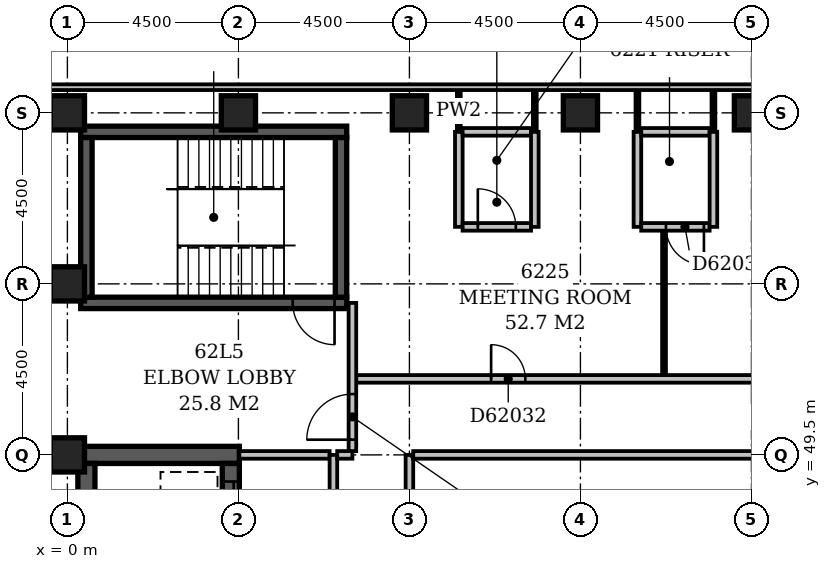
"""IFC4 building model, lengths in metres.
Left out: names, types, materials, properties, quantities, classifications, styles, units other than length and angle.
Written with IfcOpenShell. Run it as: python <this file> out.ifc"""

import sys

from ifc_helpers import new_model, si_unit, direction, frame, frame_2d, origin, origin_2d, place, context, subcontext, project, spatial, rectangle, extrude, element, fill, save


model = new_model("IFC4")
c1 = context("Model", 3, precision=1e-05, world=origin(), true_north=direction((0.0, 1.0)))
c2 = subcontext(c1, "Body", "Model", "MODEL_VIEW")
j1 = project(units=[si_unit("LENGTHUNIT", "METRE"), si_unit("PLANEANGLEUNIT", "RADIAN")], contexts=[c1])
p1 = place(None, origin())
s1 = spatial("IfcSite", under=j1, at=p1, CompositionType="ELEMENT")
p2 = place(p1, origin())
s2 = spatial("IfcBuilding", under=s1, at=p2, CompositionType="ELEMENT")
p3 = place(p2, frame((0.0, 0.0, 240.2)))
s3 = spatial("IfcBuildingStorey", under=s2, at=p3, CompositionType="ELEMENT", Elevation=240.2)
p4 = place(p3, frame((0.275, 49.5, -0.3), z_axis=(0.0, 0.0, 1.0), x_axis=(1.0, 0.0, 0.0)))
e1 = element("IfcWall", 1, at=p4, inside=s3, PredefinedType="SHEAR", context=c2, shape_type="SweptSolid", body=[
    extrude(rectangle(XDim=4.25, YDim=0.45, at=frame_2d((2.125, 0.0))), origin(), (0.0, 0.0, 1.0), 3.6),
])
p5 = place(p3, frame((0.35, 53.5, -0.3), z_axis=(0.0, 0.0, 1.0), x_axis=(1.0, 0.0, 0.0)))
e2 = element("IfcWall", 2, at=p5, inside=s3, PredefinedType="SHEAR", context=c2, shape_type="SweptSolid", body=[
    extrude(rectangle(XDim=7.0, YDim=0.3, at=frame_2d((3.5, 0.0))), origin(), (0.0, 0.0, 1.0), 3.6),
])
p6 = place(p5, frame((5.58, 0.0, 0.3)))
e3 = element("IfcOpeningElement", 3, at=p6, cuts=e2, PredefinedType="OPENING", context=c2, shape_type="SweptSolid", body=[
    extrude(rectangle(XDim=1.1, YDim=2.1, at=frame_2d((0.55, 1.05))), frame((0.0, 0.162, 0.0), z_axis=(0.0, -1.0, 0.0), x_axis=(1.0, 0.0, 0.0)), (0.0, 0.0, 1.0), 0.324),
])
p7 = place(p3, frame((0.35, 58.0, -0.3), z_axis=(0.0, 0.0, 1.0), x_axis=(1.0, 0.0, 0.0)))
e4 = element("IfcWall", 4, at=p7, inside=s3, PredefinedType="SHEAR", context=c2, shape_type="SweptSolid", body=[
    extrude(rectangle(XDim=7.0, YDim=0.3, at=frame_2d((3.5, 0.0))), origin(), (0.0, 0.0, 1.0), 3.6),
])
p8 = place(p3, frame((0.5, 27.15, -0.3), z_axis=(0.0, 0.0, 1.0), x_axis=(0.0, 1.0, 0.0)))
e5 = element("IfcWall", 5, at=p8, inside=s3, PredefinedType="SHEAR", context=c2, shape_type="SweptSolid", body=[
    extrude(rectangle(XDim=22.125, YDim=0.45, at=frame_2d((11.062, 0.0))), origin(), (0.0, 0.0, 1.0), 3.6),
])
p9 = place(p3, frame((0.5, 53.65, -0.3), z_axis=(0.0, 0.0, 1.0), x_axis=(0.0, 1.0, 0.0)))
e6 = element("IfcWall", 6, at=p9, inside=s3, PredefinedType="SHEAR", context=c2, shape_type="SweptSolid", body=[
    extrude(rectangle(XDim=4.2, YDim=0.3, at=frame_2d((2.1, 0.0))), origin(), (0.0, 0.0, 1.0), 3.6),
])
p10 = place(p3, frame((4.3, 27.15, -0.3), z_axis=(0.0, 0.0, 1.0), x_axis=(0.0, 1.0, 0.0)))
e7 = element("IfcWall", 7, at=p10, inside=s3, PredefinedType="SHEAR", context=c2, shape_type="SweptSolid", body=[
    extrude(rectangle(XDim=22.125, YDim=0.45, at=frame_2d((11.062, 0.0))), origin(), (0.0, 0.0, 1.0), 3.6),
])
p11 = place(p10, frame((3.05, 0.0, 0.3)))
e8 = element("IfcOpeningElement", 8, at=p11, cuts=e7, PredefinedType="OPENING", context=c2, shape_type="SweptSolid", body=[
    extrude(rectangle(XDim=1.1, YDim=2.1, at=frame_2d((0.55, 1.05))), frame((0.0, 0.237, 0.0), z_axis=(0.0, -1.0, 0.0), x_axis=(1.0, 0.0, 0.0)), (0.0, 0.0, 1.0), 0.474),
])
p12 = place(p10, frame((0.55, 0.0, 0.3)))
e9 = element("IfcOpeningElement", 9, at=p12, cuts=e7, PredefinedType="OPENING", context=c2, shape_type="SweptSolid", body=[
    extrude(rectangle(XDim=1.1, YDim=2.1, at=frame_2d((0.55, 1.05))), frame((0.0, 0.237, 0.0), z_axis=(0.0, -1.0, 0.0), x_axis=(1.0, 0.0, 0.0)), (0.0, 0.0, 1.0), 0.474),
])
p13 = place(p10, frame((20.55, 0.0, 0.3)))
e10 = element("IfcOpeningElement", 10, at=p13, cuts=e7, PredefinedType="OPENING", context=c2, shape_type="SweptSolid", body=[
    extrude(rectangle(XDim=1.1, YDim=2.1, at=frame_2d((0.55, 1.05))), frame((0.0, 0.237, 0.0), z_axis=(0.0, -1.0, 0.0), x_axis=(1.0, 0.0, 0.0)), (0.0, 0.0, 1.0), 0.474),
])
p14 = place(p10, frame((18.05, 0.0, 0.3)))
e11 = element("IfcOpeningElement", 11, at=p14, cuts=e7, PredefinedType="OPENING", context=c2, shape_type="SweptSolid", body=[
    extrude(rectangle(XDim=1.1, YDim=2.1, at=frame_2d((0.55, 1.05))), frame((0.0, 0.237, 0.0), z_axis=(0.0, -1.0, 0.0), x_axis=(1.0, 0.0, 0.0)), (0.0, 0.0, 1.0), 0.474),
])
p15 = place(p10, frame((15.55, 0.0, 0.3)))
e12 = element("IfcOpeningElement", 12, at=p15, cuts=e7, PredefinedType="OPENING", context=c2, shape_type="SweptSolid", body=[
    extrude(rectangle(XDim=1.1, YDim=2.1, at=frame_2d((0.55, 1.05))), frame((0.0, 0.237, 0.0), z_axis=(0.0, -1.0, 0.0), x_axis=(1.0, 0.0, 0.0)), (0.0, 0.0, 1.0), 0.474),
])
p16 = place(p10, frame((13.05, 0.0, 0.3)))
e13 = element("IfcOpeningElement", 13, at=p16, cuts=e7, PredefinedType="OPENING", context=c2, shape_type="SweptSolid", body=[
    extrude(rectangle(XDim=1.1, YDim=2.1, at=frame_2d((0.55, 1.05))), frame((0.0, 0.237, 0.0), z_axis=(0.0, -1.0, 0.0), x_axis=(1.0, 0.0, 0.0)), (0.0, 0.0, 1.0), 0.474),
])
p17 = place(p10, frame((10.55, 0.0, 0.3)))
e14 = element("IfcOpeningElement", 14, at=p17, cuts=e7, PredefinedType="OPENING", context=c2, shape_type="SweptSolid", body=[
    extrude(rectangle(XDim=1.1, YDim=2.1, at=frame_2d((0.55, 1.05))), frame((0.0, 0.237, 0.0), z_axis=(0.0, -1.0, 0.0), x_axis=(1.0, 0.0, 0.0)), (0.0, 0.0, 1.0), 0.474),
])
p18 = place(p10, frame((8.05, 0.0, 0.3)))
e15 = element("IfcOpeningElement", 15, at=p18, cuts=e7, PredefinedType="OPENING", context=c2, shape_type="SweptSolid", body=[
    extrude(rectangle(XDim=1.1, YDim=2.1, at=frame_2d((0.55, 1.05))), frame((0.0, 0.237, 0.0), z_axis=(0.0, -1.0, 0.0), x_axis=(1.0, 0.0, 0.0)), (0.0, 0.0, 1.0), 0.474),
])
p19 = place(p10, frame((5.55, 0.0, 0.3)))
e16 = element("IfcOpeningElement", 16, at=p19, cuts=e7, PredefinedType="OPENING", context=c2, shape_type="SweptSolid", body=[
    extrude(rectangle(XDim=1.1, YDim=2.1, at=frame_2d((0.55, 1.05))), frame((0.0, 0.237, 0.0), z_axis=(0.0, -1.0, 0.0), x_axis=(1.0, 0.0, 0.0)), (0.0, 0.0, 1.0), 0.474),
])
p20 = place(p3, frame((7.2, 53.65, -0.3), z_axis=(0.0, 0.0, 1.0), x_axis=(0.0, 1.0, 0.0)))
e17 = element("IfcWall", 17, at=p20, inside=s3, PredefinedType="SHEAR", context=c2, shape_type="SweptSolid", body=[
    extrude(rectangle(XDim=4.2, YDim=0.3, at=frame_2d((2.1, 0.0))), origin(), (0.0, 0.0, 1.0), 3.6),
])
for number, where, z_axis, x_axis in (
    (18, (0.0, 49.5, -0.3), (0.0, 0.0, 1.0), (1.0, 0.0, 0.0)),
    (19, (0.0, 54.0, -0.3), (0.0, 0.0, 1.0), (1.0, 0.0, 0.0)),
    (20, (0.0, 58.5, -0.3), (0.0, 0.0, 1.0), (1.0, 0.0, 0.0)),
    (21, (4.5, 58.5, -0.3), (0.0, 0.0, 1.0), (1.0, 0.0, 0.0)),
    (22, (9.0, 58.5, -0.3), (0.0, 0.0, 1.0), (1.0, 0.0, 0.0)),
    (23, (13.5, 58.5, -0.3), (0.0, 0.0, 1.0), (1.0, 0.0, 0.0)),
    (24, (18.0, 58.5, -0.3), (0.0, 0.0, 1.0), (1.0, 0.0, 0.0)),
):
    element("IfcColumn", number, at=place(p3, frame(where, z_axis=z_axis, x_axis=x_axis)), inside=s3, PredefinedType="COLUMN", context=c2, shape_type="SweptSolid", body=[
        extrude(rectangle(XDim=0.9, YDim=0.9, at=origin_2d()), origin(), (0.0, 0.0, 1.0), 3.6),
    ])
p21 = place(p3, frame((27.0, 59.175, 0.0), z_axis=(0.0, 0.0, 1.0), x_axis=(-1.0, 0.0, 0.0)))
e25 = element("IfcWall", 25, at=p21, inside=s3, PredefinedType="STANDARD", context=c2, shape_type="SweptSolid", body=[
    extrude(rectangle(XDim=27.75, YDim=0.15, at=frame_2d((13.875, 0.0))), origin(), (0.0, 0.0, 1.0), 2.7),
])
p22 = place(p3, frame((7.0, 34.6, 0.0), z_axis=(0.0, 0.0, 1.0), x_axis=(0.0, 1.0, 0.0)))
e26 = element("IfcWall", 26, at=p22, inside=s3, PredefinedType="PARTITIONING", context=c2, shape_type="SweptSolid", body=[
    extrude(rectangle(XDim=14.9, YDim=0.2, at=frame_2d((7.45, 0.0))), origin(), (0.0, 0.0, 1.0), 3.3),
])
p23 = place(p22, frame((2.8, 0.0, 0.0)))
e27 = element("IfcOpeningElement", 27, at=p23, cuts=e26, PredefinedType="OPENING", context=c2, shape_type="SweptSolid", body=[
    extrude(rectangle(XDim=1.2, YDim=2.1, at=frame_2d((0.6, 1.05))), frame((0.0, 0.112, 0.0), z_axis=(0.0, -1.0, 0.0), x_axis=(1.0, 0.0, 0.0)), (0.0, 0.0, 1.0), 0.224),
])
p24 = place(p22, frame((9.8, 0.0, 0.0)))
e28 = element("IfcOpeningElement", 28, at=p24, cuts=e26, PredefinedType="OPENING", context=c2, shape_type="SweptSolid", body=[
    extrude(rectangle(XDim=1.2, YDim=2.1, at=frame_2d((0.6, 1.05))), frame((0.0, 0.112, 0.0), z_axis=(0.0, -1.0, 0.0), x_axis=(1.0, 0.0, 0.0)), (0.0, 0.0, 1.0), 0.224),
])
p25 = place(p3, frame((4.525, 49.5, 0.0), z_axis=(0.0, 0.0, 1.0), x_axis=(1.0, 0.0, 0.0)))
e29 = element("IfcWall", 29, at=p25, inside=s3, PredefinedType="PARTITIONING", context=c2, shape_type="SweptSolid", body=[
    extrude(rectangle(XDim=2.375, YDim=0.2, at=frame_2d((1.188, 0.0))), origin(), (0.0, 0.0, 1.0), 3.3),
])
p26 = place(p3, frame((7.1, 49.5, 0.0), z_axis=(0.0, 0.0, 1.0), x_axis=(1.0, 0.0, 0.0)))
e30 = element("IfcWall", 30, at=p26, inside=s3, PredefinedType="PARTITIONING", context=c2, shape_type="SweptSolid", body=[
    extrude(rectangle(XDim=0.4, YDim=0.2, at=frame_2d((0.2, 0.0))), origin(), (0.0, 0.0, 1.0), 3.3),
])
p27 = place(p3, frame((7.5, 49.6, 0.0), z_axis=(0.0, 0.0, 1.0), x_axis=(0.0, 1.0, 0.0)))
e31 = element("IfcWall", 31, at=p27, inside=s3, PredefinedType="PARTITIONING", context=c2, shape_type="SweptSolid", body=[
    extrude(rectangle(XDim=3.9, YDim=0.2, at=frame_2d((1.95, 0.0))), origin(), (0.0, 0.0, 1.0), 3.3),
])
p28 = place(p27, frame((0.3, 0.0, 0.0)))
e32 = element("IfcOpeningElement", 32, at=p28, cuts=e31, PredefinedType="OPENING", context=c2, shape_type="SweptSolid", body=[
    extrude(rectangle(XDim=1.2, YDim=2.1, at=frame_2d((0.6, 1.05))), frame((0.0, 0.112, 0.0), z_axis=(0.0, -1.0, 0.0), x_axis=(1.0, 0.0, 0.0)), (0.0, 0.0, 1.0), 0.224),
])
p29 = place(p3, frame((9.0, 38.0, 0.0), z_axis=(0.0, 0.0, 1.0), x_axis=(0.0, 1.0, 0.0)))
e33 = element("IfcWall", 33, at=p29, inside=s3, PredefinedType="PARTITIONING", context=c2, shape_type="SweptSolid", body=[
    extrude(rectangle(XDim=11.5, YDim=0.2, at=frame_2d((5.75, 0.0))), origin(), (0.0, 0.0, 1.0), 3.3),
])
p30 = place(p29, frame((5.25, 0.0, 0.0)))
e34 = element("IfcOpeningElement", 34, at=p30, cuts=e33, PredefinedType="OPENING", context=c2, shape_type="SweptSolid", body=[
    extrude(rectangle(XDim=0.9, YDim=2.1, at=frame_2d((0.45, 1.05))), frame((0.0, 0.112, 0.0), z_axis=(0.0, -1.0, 0.0), x_axis=(1.0, 0.0, 0.0)), (0.0, 0.0, 1.0), 0.224),
])
p31 = place(p3, frame((9.1, 49.5, 0.0), z_axis=(0.0, 0.0, 1.0), x_axis=(1.0, 0.0, 0.0)))
e35 = element("IfcWall", 35, at=p31, inside=s3, PredefinedType="PARTITIONING", context=c2, shape_type="SweptSolid", body=[
    extrude(rectangle(XDim=11.3, YDim=0.2, at=frame_2d((5.65, 0.0))), origin(), (0.0, 0.0, 1.0), 3.3),
])
p32 = place(p3, frame((7.6, 51.5, 0.0), z_axis=(0.0, 0.0, 1.0), x_axis=(1.0, 0.0, 0.0)))
e36 = element("IfcWall", 36, at=p32, inside=s3, PredefinedType="PARTITIONING", context=c2, shape_type="SweptSolid", body=[
    extrude(rectangle(XDim=14.65, YDim=0.2, at=frame_2d((7.325, 0.0))), origin(), (0.0, 0.0, 1.0), 3.3),
])
p33 = place(p32, frame((3.55, 0.0, 0.0)))
e37 = element("IfcOpeningElement", 37, at=p33, cuts=e36, PredefinedType="OPENING", context=c2, shape_type="SweptSolid", body=[
    extrude(rectangle(XDim=0.9, YDim=2.1, at=frame_2d((0.45, 1.05))), frame((0.0, 0.112, 0.0), z_axis=(0.0, -1.0, 0.0), x_axis=(1.0, 0.0, 0.0)), (0.0, 0.0, 1.0), 0.224),
])
p34 = place(p32, frame((10.925, 0.0, 0.0)))
e38 = element("IfcOpeningElement", 38, at=p34, cuts=e36, PredefinedType="OPENING", context=c2, shape_type="SweptSolid", body=[
    extrude(rectangle(XDim=1.0, YDim=2.1, at=frame_2d((0.5, 1.05))), frame((0.0, 0.112, 0.0), z_axis=(0.0, -1.0, 0.0), x_axis=(1.0, 0.0, 0.0)), (0.0, 0.0, 1.0), 0.224),
])
p35 = place(p3, frame((15.7, 51.6, 0.0), z_axis=(0.0, 0.0, 1.0), x_axis=(0.0, 1.0, 0.0)))
e39 = element("IfcWall", 39, at=p35, inside=s3, PredefinedType="PARTITIONING", context=c2, shape_type="SweptSolid", body=[
    extrude(rectangle(XDim=3.8, YDim=0.1, at=frame_2d((1.9, 0.0))), origin(), (0.0, 0.0, 1.0), 3.3),
])
p36 = place(p3, frame((10.3, 55.5, 0.0), z_axis=(0.0, 0.0, 1.0), x_axis=(0.0, 1.0, 0.0)))
e40 = element("IfcWall", 40, at=p36, inside=s3, PredefinedType="PARTITIONING", context=c2, shape_type="SweptSolid", body=[
    extrude(rectangle(XDim=2.5, YDim=0.2, at=frame_2d((1.25, 0.0))), origin(), (0.0, 0.0, 1.0), 3.3),
])
p37 = place(p3, frame((10.4, 55.5, 0.0), z_axis=(0.0, 0.0, 1.0), x_axis=(1.0, 0.0, 0.0)))
e41 = element("IfcWall", 41, at=p37, inside=s3, PredefinedType="PARTITIONING", context=c2, shape_type="SweptSolid", body=[
    extrude(rectangle(XDim=1.8, YDim=0.2, at=frame_2d((0.9, 0.0))), origin(), (0.0, 0.0, 1.0), 3.3),
])
p38 = place(p37, frame((0.4, 0.0, 0.0)))
e42 = element("IfcOpeningElement", 42, at=p38, cuts=e41, PredefinedType="OPENING", context=c2, shape_type="SweptSolid", body=[
    extrude(rectangle(XDim=1.0, YDim=2.1, at=frame_2d((0.5, 1.05))), frame((0.0, 0.112, 0.0), z_axis=(0.0, -1.0, 0.0), x_axis=(1.0, 0.0, 0.0)), (0.0, 0.0, 1.0), 0.224),
])
for number, where, z_axis, x_axis in (
    (43, (12.3, 55.5, 0.0), (0.0, 0.0, 1.0), (0.0, 1.0, 0.0)),
    (44, (15.0, 55.5, 0.0), (0.0, 0.0, 1.0), (0.0, 1.0, 0.0)),
):
    element("IfcWall", number, at=place(p3, frame(where, z_axis=z_axis, x_axis=x_axis)), inside=s3, PredefinedType="PARTITIONING", context=c2, shape_type="SweptSolid", body=[
        extrude(rectangle(XDim=2.5, YDim=0.2, at=frame_2d((1.25, 0.0))), origin(), (0.0, 0.0, 1.0), 3.3),
    ])
p39 = place(p3, frame((15.1, 55.5, 0.0), z_axis=(0.0, 0.0, 1.0), x_axis=(1.0, 0.0, 0.0)))
e45 = element("IfcWall", 45, at=p39, inside=s3, PredefinedType="PARTITIONING", context=c2, shape_type="SweptSolid", body=[
    extrude(rectangle(XDim=1.8, YDim=0.2, at=frame_2d((0.9, 0.0))), origin(), (0.0, 0.0, 1.0), 3.3),
])
p40 = place(p39, frame((0.65, 0.0, 0.0)))
e46 = element("IfcOpeningElement", 46, at=p40, cuts=e45, PredefinedType="OPENING", context=c2, shape_type="SweptSolid", body=[
    extrude(rectangle(XDim=1.0, YDim=2.1, at=frame_2d((0.5, 1.05))), frame((0.0, 0.112, 0.0), z_axis=(0.0, -1.0, 0.0), x_axis=(1.0, 0.0, 0.0)), (0.0, 0.0, 1.0), 0.224),
])
p41 = place(p3, frame((17.0, 55.5, 0.0), z_axis=(0.0, 0.0, 1.0), x_axis=(0.0, 1.0, 0.0)))
e47 = element("IfcWall", 47, at=p41, inside=s3, PredefinedType="PARTITIONING", context=c2, shape_type="SweptSolid", body=[
    extrude(rectangle(XDim=2.5, YDim=0.2, at=frame_2d((1.25, 0.0))), origin(), (0.0, 0.0, 1.0), 3.3),
])
p42 = place(p3, frame((10.3, 58.0, 0.0), z_axis=(0.0, 0.0, 1.0), x_axis=(0.0, 1.0, 0.0)))
e48 = element("IfcWall", 48, at=p42, inside=s3, PredefinedType="PARTITIONING", context=c2, shape_type="SweptSolid", body=[
    extrude(rectangle(XDim=1.1, YDim=0.1, at=frame_2d((0.55, 0.0))), origin(), (0.0, 0.0, 1.0), 3.3),
])
p43 = place(p3, frame((10.4, 58.0, 0.0), z_axis=(0.0, 0.0, 1.0), x_axis=(1.0, 0.0, 0.0)))
e49 = element("IfcWall", 49, at=p43, inside=s3, PredefinedType="PARTITIONING", context=c2, shape_type="SweptSolid", body=[
    extrude(rectangle(XDim=1.8, YDim=0.2, at=frame_2d((0.9, 0.0))), origin(), (0.0, 0.0, 1.0), 3.3),
])
for number, where, z_axis, x_axis in (
    (50, (12.3, 58.0, 0.0), (0.0, 0.0, 1.0), (0.0, 1.0, 0.0)),
    (51, (15.0, 58.0, 0.0), (0.0, 0.0, 1.0), (0.0, 1.0, 0.0)),
):
    element("IfcWall", number, at=place(p3, frame(where, z_axis=z_axis, x_axis=x_axis)), inside=s3, PredefinedType="PARTITIONING", context=c2, shape_type="SweptSolid", body=[
        extrude(rectangle(XDim=1.1, YDim=0.1, at=frame_2d((0.55, 0.0))), origin(), (0.0, 0.0, 1.0), 3.3),
    ])
p44 = place(p3, frame((15.1, 58.0, 0.0), z_axis=(0.0, 0.0, 1.0), x_axis=(1.0, 0.0, 0.0)))
e52 = element("IfcWall", 52, at=p44, inside=s3, PredefinedType="PARTITIONING", context=c2, shape_type="SweptSolid", body=[
    extrude(rectangle(XDim=1.8, YDim=0.2, at=frame_2d((0.9, 0.0))), origin(), (0.0, 0.0, 1.0), 3.3),
])
p45 = place(p3, frame((17.0, 58.0, 0.0), z_axis=(0.0, 0.0, 1.0), x_axis=(0.0, 1.0, 0.0)))
e53 = element("IfcWall", 53, at=p45, inside=s3, PredefinedType="PARTITIONING", context=c2, shape_type="SweptSolid", body=[
    extrude(rectangle(XDim=1.1, YDim=0.1, at=frame_2d((0.55, 0.0))), origin(), (0.0, 0.0, 1.0), 3.3),
])
p46 = place(p28, origin())
e54 = element("IfcDoor", 54, at=p46, inside=s3, OperationType="SINGLE_SWING_LEFT", PredefinedType="DOOR", context=c2, shape_type="SweptSolid", body=[
    extrude(rectangle(XDim=1.2, YDim=2.1, at=frame_2d((0.6, 1.05))), frame((0.0, 0.025, 0.0), z_axis=(0.0, -1.0, 0.0), x_axis=(1.0, 0.0, 0.0)), (0.0, 0.0, 1.0), 0.05),
])
fill(e32, e54)
p47 = place(p13, origin())
e55 = element("IfcDoor", 55, at=p47, inside=s3, OperationType="SLIDING_TO_LEFT", PredefinedType="DOOR", context=c2, shape_type="SweptSolid", body=[
    extrude(rectangle(XDim=1.1, YDim=2.1, at=frame_2d((0.55, 1.05))), frame((0.0, 0.025, 0.0), z_axis=(0.0, -1.0, 0.0), x_axis=(1.0, 0.0, 0.0)), (0.0, 0.0, 1.0), 0.05),
])
fill(e10, e55)
p48 = place(p6, origin())
e56 = element("IfcDoor", 56, at=p48, inside=s3, OperationType="SINGLE_SWING_RIGHT", PredefinedType="DOOR", context=c2, shape_type="SweptSolid", body=[
    extrude(rectangle(XDim=1.1, YDim=2.1, at=frame_2d((0.55, 1.05))), frame((0.0, 0.025, 0.0), z_axis=(0.0, -1.0, 0.0), x_axis=(1.0, 0.0, 0.0)), (0.0, 0.0, 1.0), 0.05),
])
fill(e3, e56)
p49 = place(p33, origin())
e57 = element("IfcDoor", 57, at=p49, inside=s3, OperationType="SINGLE_SWING_LEFT", PredefinedType="DOOR", context=c2, shape_type="SweptSolid", body=[
    extrude(rectangle(XDim=0.9, YDim=2.1, at=frame_2d((0.45, 1.05))), frame((0.0, 0.025, 0.0), z_axis=(0.0, -1.0, 0.0), x_axis=(1.0, 0.0, 0.0)), (0.0, 0.0, 1.0), 0.05),
])
fill(e37, e57)
p50 = place(p38, origin())
e58 = element("IfcDoor", 58, at=p50, inside=s3, OperationType="SINGLE_SWING_LEFT", PredefinedType="DOOR", context=c2, shape_type="SweptSolid", body=[
    extrude(rectangle(XDim=1.0, YDim=2.1, at=frame_2d((0.5, 1.05))), frame((0.0, 0.025, 0.0), z_axis=(0.0, -1.0, 0.0), x_axis=(1.0, 0.0, 0.0)), (0.0, 0.0, 1.0), 0.05),
])
fill(e42, e58)
p51 = place(p40, origin())
e59 = element("IfcDoor", 59, at=p51, inside=s3, OperationType="SINGLE_SWING_RIGHT", PredefinedType="DOOR", context=c2, shape_type="SweptSolid", body=[
    extrude(rectangle(XDim=1.0, YDim=2.1, at=frame_2d((0.5, 1.05))), frame((0.0, 0.025, 0.0), z_axis=(0.0, -1.0, 0.0), x_axis=(1.0, 0.0, 0.0)), (0.0, 0.0, 1.0), 0.05),
])
fill(e46, e59)
save(model, sys.argv[1])
